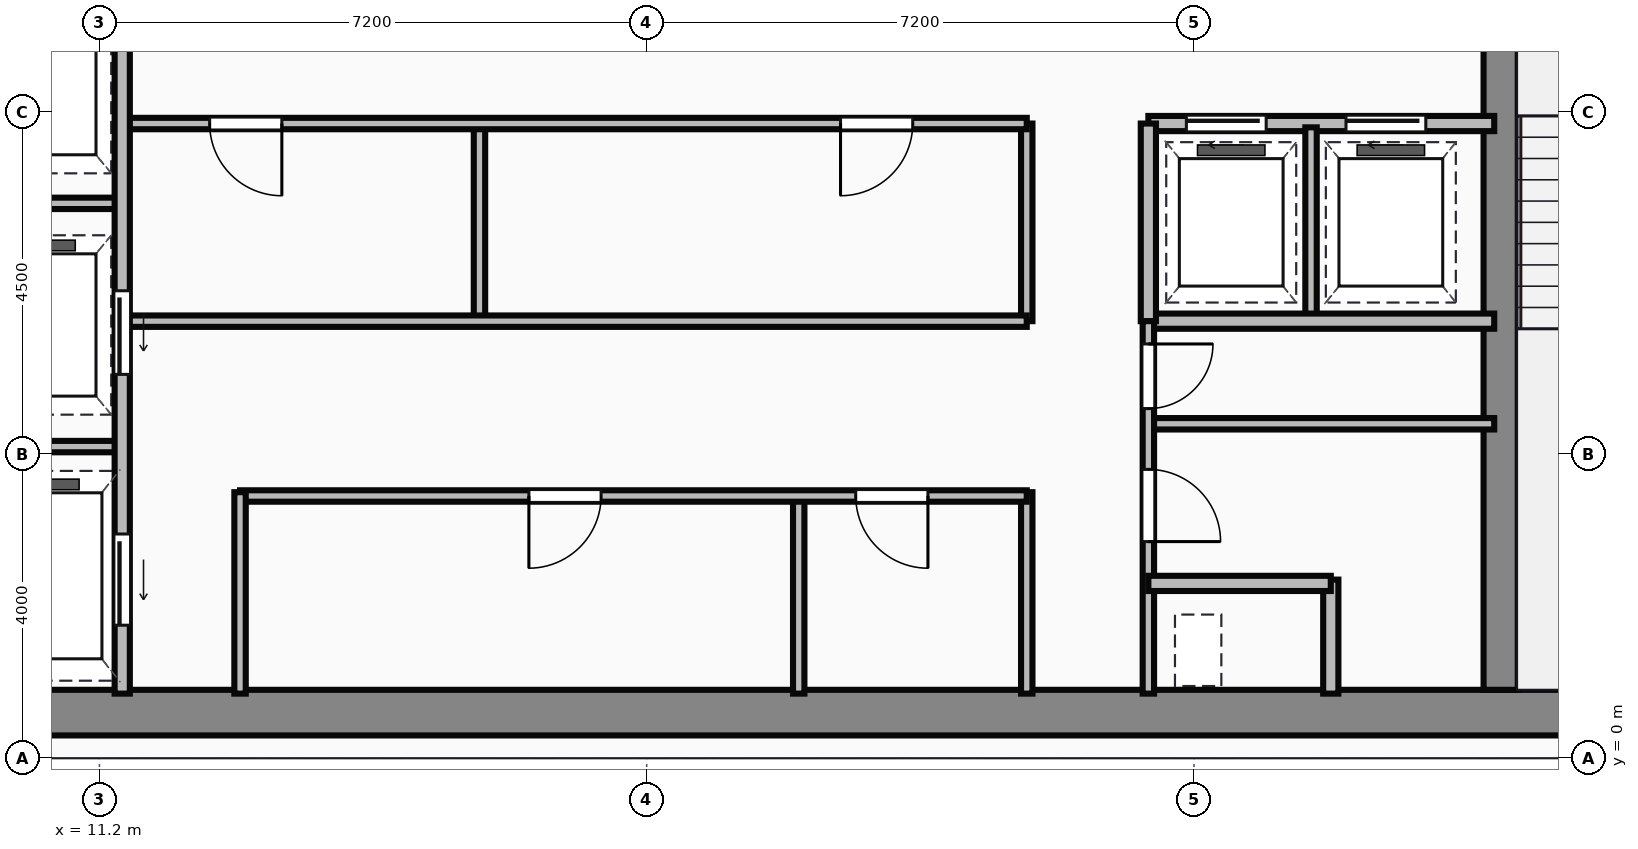
"""IFC4 building model, lengths in metres.
Left out: names, types, materials, properties, quantities, classifications, styles, units other than length and angle.
Written with IfcOpenShell. Run it as: python <this file> out.ifc"""

import sys

from ifc_helpers import new_model, si_unit, direction, frame, frame_2d, origin, place, context, subcontext, project, spatial, rectangle, extrude, source, transform, mapped, element, fill, save


model = new_model("IFC4")
c1 = context("Model", 3, precision=1e-05, world=origin(), true_north=direction((0.0, 1.0)))
c2 = subcontext(c1, "Body", "Model", "MODEL_VIEW")
j1 = project(units=[si_unit("LENGTHUNIT", "METRE"), si_unit("PLANEANGLEUNIT", "RADIAN")], contexts=[c1])
p1 = place(None, origin())
s1 = spatial("IfcSite", under=j1, at=p1, CompositionType="ELEMENT")
p2 = place(p1, origin())
s2 = spatial("IfcBuilding", under=s1, at=p2, CompositionType="ELEMENT")
p3 = place(p2, frame((0.0, 0.0, 199.55)))
s3 = spatial("IfcBuildingStorey", under=s2, at=p3, CompositionType="ELEMENT", Elevation=199.55)
m1 = source(origin(), c2, "Body", "SweptSolid", [
    extrude(rectangle(XDim=29.5, YDim=0.6, at=frame_2d((14.75, 0.0))), origin(), (0.0, 0.0, 1.0), 3.65),
])
p4 = place(p3, frame((4.5, 0.6, 0.0), z_axis=(0.0, 0.0, 1.0), x_axis=(1.0, 0.0, 0.0)))
e1 = element("IfcWall", 1, at=p4, inside=s3, PredefinedType="SHEAR", context=c2, shape_type="MappedRepresentation", body=[
    mapped(m1, transform((0.0, 0.0, 0.0))),
])
m2 = source(origin(), c2, "Body", "SweptSolid", [
    extrude(rectangle(XDim=12.5, YDim=0.45, at=frame_2d((6.25, 0.0))), origin(), (0.0, 0.0, 1.0), 3.65),
])
p5 = place(p3, frame((29.635, 0.9, 0.0), z_axis=(0.0, 0.0, 1.0), x_axis=(0.0, 1.0, 0.0)))
e2 = element("IfcWall", 2, at=p5, inside=s3, PredefinedType="SHEAR", context=c2, shape_type="MappedRepresentation", body=[
    mapped(m2, transform((0.0, 0.0, 0.0))),
])
m3 = source(origin(), c2, "Body", "SweptSolid", [
    extrude(rectangle(XDim=9.6, YDim=0.2, at=frame_2d((4.8, 0.0))), origin(), (0.0, 0.0, 1.0), 3.4),
])
p6 = place(p3, frame((11.5, 0.85, 0.0), z_axis=(0.0, 0.0, 1.0), x_axis=(0.0, 1.0, 0.0)))
e3 = element("IfcWall", 3, at=p6, inside=s3, PredefinedType="PARTITIONING", context=c2, shape_type="MappedRepresentation", body=[
    mapped(m3, transform((0.0, 0.0, 0.0))),
])
p7 = place(p6, frame((4.2, 0.0, 0.0)))
e4 = element("IfcOpeningElement", 4, at=p7, cuts=e3, PredefinedType="OPENING", context=c2, shape_type="SweptSolid", body=[
    extrude(rectangle(XDim=1.1, YDim=2.15, at=frame_2d((0.55, 1.075))), frame((0.0, 0.11, 0.0), z_axis=(0.0, -1.0, 0.0), x_axis=(1.0, 0.0, 0.0)), (0.0, 0.0, 1.0), 0.22),
])
p8 = place(p6, frame((0.9, 0.0, 0.0)))
e5 = element("IfcOpeningElement", 5, at=p8, cuts=e3, PredefinedType="OPENING", context=c2, shape_type="SweptSolid", body=[
    extrude(rectangle(XDim=1.2, YDim=2.15, at=frame_2d((0.6, 1.075))), frame((0.0, 0.11, 0.0), z_axis=(0.0, -1.0, 0.0), x_axis=(1.0, 0.0, 0.0)), (0.0, 0.0, 1.0), 0.22),
])
m4 = source(origin(), c2, "Body", "SweptSolid", [
    extrude(rectangle(XDim=2.4, YDim=0.15, at=frame_2d((1.2, 0.0))), origin(), (0.0, 0.0, 1.0), 3.4),
])
for number, where, z_axis, x_axis in (
    (6, (9.1, 4.1, 0.0), (0.0, 0.0, 1.0), (1.0, 0.0, 0.0)),
    (7, (9.1, 7.3, 0.0), (0.0, 0.0, 1.0), (1.0, 0.0, 0.0)),
):
    element("IfcWall", number, at=place(p3, frame(where, z_axis=z_axis, x_axis=x_axis)), inside=s3, PredefinedType="PARTITIONING", context=c2, shape_type="MappedRepresentation", body=[
        mapped(m4, transform((0.0, 0.0, 0.0))),
    ])
m5 = source(origin(), c2, "Body", "SweptSolid", [
    extrude(rectangle(XDim=2.65, YDim=0.15, at=frame_2d((1.325, 0.0))), origin(), (0.0, 0.0, 1.0), 3.4),
])
p9 = place(p3, frame((13.05, 0.85, 0.0), z_axis=(0.0, 0.0, 1.0), x_axis=(0.0, 1.0, 0.0)))
e8 = element("IfcWall", 8, at=p9, inside=s3, PredefinedType="PARTITIONING", context=c2, shape_type="MappedRepresentation", body=[
    mapped(m5, transform((0.0, 0.0, 0.0))),
])
m6 = source(origin(), c2, "Body", "SweptSolid", [
    extrude(rectangle(XDim=10.35, YDim=0.15, at=frame_2d((5.175, 0.0))), origin(), (0.0, 0.0, 1.0), 3.4),
])
p10 = place(p3, frame((13.05, 3.45, 0.0), z_axis=(0.0, 0.0, 1.0), x_axis=(1.0, 0.0, 0.0)))
e9 = element("IfcWall", 9, at=p10, inside=s3, PredefinedType="PARTITIONING", context=c2, shape_type="MappedRepresentation", body=[
    mapped(m6, transform((0.0, 0.0, 0.0))),
])
p11 = place(p10, frame((3.8, 0.0, 0.0)))
e10 = element("IfcOpeningElement", 10, at=p11, cuts=e9, PredefinedType="OPENING", context=c2, shape_type="SweptSolid", body=[
    extrude(rectangle(XDim=0.95, YDim=2.15, at=frame_2d((0.475, 1.075))), frame((0.0, 0.085, 0.0), z_axis=(0.0, -1.0, 0.0), x_axis=(1.0, 0.0, 0.0)), (0.0, 0.0, 1.0), 0.17),
])
p12 = place(p10, frame((8.1, 0.0, 0.0)))
e11 = element("IfcOpeningElement", 11, at=p12, cuts=e9, PredefinedType="OPENING", context=c2, shape_type="SweptSolid", body=[
    extrude(rectangle(XDim=0.95, YDim=2.15, at=frame_2d((0.475, 1.075))), frame((0.0, 0.085, 0.0), z_axis=(0.0, -1.0, 0.0), x_axis=(1.0, 0.0, 0.0)), (0.0, 0.0, 1.0), 0.17),
])
p13 = place(p3, frame((23.4, 0.85, 0.0), z_axis=(0.0, 0.0, 1.0), x_axis=(0.0, 1.0, 0.0)))
e12 = element("IfcWall", 12, at=p13, inside=s3, PredefinedType="PARTITIONING", context=c2, shape_type="MappedRepresentation", body=[
    mapped(m5, transform((0.0, 0.0, 0.0))),
])
m7 = source(origin(), c2, "Body", "SweptSolid", [
    extrude(rectangle(XDim=2.6, YDim=0.15, at=frame_2d((1.3, 0.0))), origin(), (0.0, 0.0, 1.0), 3.4),
])
p14 = place(p3, frame((20.4, 0.85, 0.0), z_axis=(0.0, 0.0, 1.0), x_axis=(0.0, 1.0, 0.0)))
e13 = element("IfcWall", 13, at=p14, inside=s3, PredefinedType="PARTITIONING", context=c2, shape_type="MappedRepresentation", body=[
    mapped(m7, transform((0.0, 0.0, 0.0))),
])
m8 = source(origin(), c2, "Body", "SweptSolid", [
    extrude(rectangle(XDim=11.85, YDim=0.15, at=frame_2d((5.925, 0.0))), origin(), (0.0, 0.0, 1.0), 3.4),
])
p15 = place(p3, frame((11.55, 5.75, 0.0), z_axis=(0.0, 0.0, 1.0), x_axis=(1.0, 0.0, 0.0)))
e14 = element("IfcWall", 14, at=p15, inside=s3, PredefinedType="PARTITIONING", context=c2, shape_type="MappedRepresentation", body=[
    mapped(m8, transform((0.0, 0.0, 0.0))),
])
p16 = place(p3, frame((11.55, 8.35, 0.0), z_axis=(0.0, 0.0, 1.0), x_axis=(1.0, 0.0, 0.0)))
e15 = element("IfcWall", 15, at=p16, inside=s3, PredefinedType="PARTITIONING", context=c2, shape_type="MappedRepresentation", body=[
    mapped(m8, transform((0.0, 0.0, 0.0))),
])
p17 = place(p16, frame((1.1, 0.0, 0.0)))
e16 = element("IfcOpeningElement", 16, at=p17, cuts=e15, PredefinedType="OPENING", context=c2, shape_type="SweptSolid", body=[
    extrude(rectangle(XDim=0.95, YDim=2.15, at=frame_2d((0.475, 1.075))), frame((0.0, 0.085, 0.0), z_axis=(0.0, -1.0, 0.0), x_axis=(1.0, 0.0, 0.0)), (0.0, 0.0, 1.0), 0.17),
])
p18 = place(p16, frame((9.4, 0.0, 0.0)))
e17 = element("IfcOpeningElement", 17, at=p18, cuts=e15, PredefinedType="OPENING", context=c2, shape_type="SweptSolid", body=[
    extrude(rectangle(XDim=0.95, YDim=2.15, at=frame_2d((0.475, 1.075))), frame((0.0, 0.085, 0.0), z_axis=(0.0, -1.0, 0.0), x_axis=(1.0, 0.0, 0.0)), (0.0, 0.0, 1.0), 0.17),
])
m9 = source(origin(), c2, "Body", "SweptSolid", [
    extrude(rectangle(XDim=2.6, YDim=0.15, at=frame_2d((1.3, 0.0))), origin(), (0.0, 0.0, 1.0), 3.4),
])
p19 = place(p3, frame((23.4, 5.75, 0.0), z_axis=(0.0, 0.0, 1.0), x_axis=(0.0, 1.0, 0.0)))
e18 = element("IfcWall", 18, at=p19, inside=s3, PredefinedType="PARTITIONING", context=c2, shape_type="MappedRepresentation", body=[
    mapped(m9, transform((0.0, 0.0, 0.0))),
])
m10 = source(origin(), c2, "Body", "SweptSolid", [
    extrude(rectangle(XDim=2.5, YDim=0.15, at=frame_2d((1.25, 0.0))), origin(), (0.0, 0.0, 1.0), 3.4),
])
p20 = place(p3, frame((16.2, 5.8, 0.0), z_axis=(0.0, 0.0, 1.0), x_axis=(0.0, 1.0, 0.0)))
e19 = element("IfcWall", 19, at=p20, inside=s3, PredefinedType="PARTITIONING", context=c2, shape_type="MappedRepresentation", body=[
    mapped(m10, transform((0.0, 0.0, 0.0))),
])
m11 = source(origin(), c2, "Body", "SweptSolid", [
    extrude(rectangle(XDim=4.55, YDim=0.2, at=frame_2d((2.275, 0.0))), origin(), (0.0, 0.0, 1.0), 3.4),
])
p21 = place(p3, frame((25.0, 8.35, 0.0), z_axis=(0.0, 0.0, 1.0), x_axis=(1.0, 0.0, 0.0)))
e20 = element("IfcWall", 20, at=p21, inside=s3, PredefinedType="PARTITIONING", context=c2, shape_type="MappedRepresentation", body=[
    mapped(m11, transform((0.0, 0.0, 0.0))),
])
p22 = place(p21, frame((0.5, 0.0, 0.0)))
e21 = element("IfcOpeningElement", 21, at=p22, cuts=e20, PredefinedType="OPENING", context=c2, shape_type="SweptSolid", body=[
    extrude(rectangle(XDim=1.05, YDim=2.15, at=frame_2d((0.525, 1.075))), frame((0.0, 0.11, 0.0), z_axis=(0.0, -1.0, 0.0), x_axis=(1.0, 0.0, 0.0)), (0.0, 0.0, 1.0), 0.22),
])
p23 = place(p21, frame((2.6, 0.0, 0.0)))
e22 = element("IfcOpeningElement", 22, at=p23, cuts=e20, PredefinedType="OPENING", context=c2, shape_type="SweptSolid", body=[
    extrude(rectangle(XDim=1.05, YDim=2.15, at=frame_2d((0.525, 1.075))), frame((0.0, 0.11, 0.0), z_axis=(0.0, -1.0, 0.0), x_axis=(1.0, 0.0, 0.0)), (0.0, 0.0, 1.0), 0.22),
])
p24 = place(p3, frame((25.0, 5.75, 0.0), z_axis=(0.0, 0.0, 1.0), x_axis=(1.0, 0.0, 0.0)))
e23 = element("IfcWall", 23, at=p24, inside=s3, PredefinedType="PARTITIONING", context=c2, shape_type="MappedRepresentation", body=[
    mapped(m11, transform((0.0, 0.0, 0.0))),
])
m12 = source(origin(), c2, "Body", "SweptSolid", [
    extrude(rectangle(XDim=2.6, YDim=0.2, at=frame_2d((1.3, 0.0))), origin(), (0.0, 0.0, 1.0), 3.4),
])
p25 = place(p3, frame((25.0, 5.75, 0.0), z_axis=(0.0, 0.0, 1.0), x_axis=(0.0, 1.0, 0.0)))
e24 = element("IfcWall", 24, at=p25, inside=s3, PredefinedType="PARTITIONING", context=c2, shape_type="MappedRepresentation", body=[
    mapped(m12, transform((0.0, 0.0, 0.0))),
])
p26 = place(p3, frame((27.14, 5.8, 0.0), z_axis=(0.0, 0.0, 1.0), x_axis=(0.0, 1.0, 0.0)))
e25 = element("IfcWall", 25, at=p26, inside=s3, PredefinedType="PARTITIONING", context=c2, shape_type="MappedRepresentation", body=[
    mapped(m10, transform((0.0, 0.0, 0.0))),
])
m13 = source(origin(), c2, "Body", "SweptSolid", [
    extrude(rectangle(XDim=4.9, YDim=0.15, at=frame_2d((2.45, 0.0))), origin(), (0.0, 0.0, 1.0), 3.4),
])
p27 = place(p3, frame((25.0, 0.85, 0.0), z_axis=(0.0, 0.0, 1.0), x_axis=(0.0, 1.0, 0.0)))
e26 = element("IfcWall", 26, at=p27, inside=s3, PredefinedType="PARTITIONING", context=c2, shape_type="MappedRepresentation", body=[
    mapped(m13, transform((0.0, 0.0, 0.0))),
])
p28 = place(p27, frame((2.0, 0.0, 0.0)))
e27 = element("IfcOpeningElement", 27, at=p28, cuts=e26, PredefinedType="OPENING", context=c2, shape_type="SweptSolid", body=[
    extrude(rectangle(XDim=0.95, YDim=2.15, at=frame_2d((0.475, 1.075))), frame((0.0, 0.085, 0.0), z_axis=(0.0, -1.0, 0.0), x_axis=(1.0, 0.0, 0.0)), (0.0, 0.0, 1.0), 0.17),
])
p29 = place(p27, frame((3.75, 0.0, 0.0)))
e28 = element("IfcOpeningElement", 28, at=p29, cuts=e26, PredefinedType="OPENING", context=c2, shape_type="SweptSolid", body=[
    extrude(rectangle(XDim=0.85, YDim=2.15, at=frame_2d((0.425, 1.075))), frame((0.0, 0.085, 0.0), z_axis=(0.0, -1.0, 0.0), x_axis=(1.0, 0.0, 0.0)), (0.0, 0.0, 1.0), 0.17),
])
m14 = source(origin(), c2, "Body", "SweptSolid", [
    extrude(rectangle(XDim=2.4, YDim=0.2, at=frame_2d((1.2, 0.0))), origin(), (0.0, 0.0, 1.0), 3.4),
])
p30 = place(p3, frame((25.0, 2.3, 0.0), z_axis=(0.0, 0.0, 1.0), x_axis=(1.0, 0.0, 0.0)))
e29 = element("IfcWall", 29, at=p30, inside=s3, PredefinedType="PARTITIONING", context=c2, shape_type="MappedRepresentation", body=[
    mapped(m14, transform((0.0, 0.0, 0.0))),
])
m15 = source(origin(), c2, "Body", "SweptSolid", [
    extrude(rectangle(XDim=1.5, YDim=0.2, at=frame_2d((0.75, 0.0))), origin(), (0.0, 0.0, 1.0), 3.4),
])
p31 = place(p3, frame((27.4, 0.85, 0.0), z_axis=(0.0, 0.0, 1.0), x_axis=(0.0, 1.0, 0.0)))
e30 = element("IfcWall", 30, at=p31, inside=s3, PredefinedType="PARTITIONING", context=c2, shape_type="MappedRepresentation", body=[
    mapped(m15, transform((0.0, 0.0, 0.0))),
])
m16 = source(origin(), c2, "Body", "SweptSolid", [
    extrude(rectangle(XDim=4.55, YDim=0.15, at=frame_2d((2.275, 0.0))), origin(), (0.0, 0.0, 1.0), 3.4),
])
p32 = place(p3, frame((25.0, 4.4, 0.0), z_axis=(0.0, 0.0, 1.0), x_axis=(1.0, 0.0, 0.0)))
e31 = element("IfcWall", 31, at=p32, inside=s3, PredefinedType="PARTITIONING", context=c2, shape_type="MappedRepresentation", body=[
    mapped(m16, transform((0.0, 0.0, 0.0))),
])
m17 = source(origin(), c2, "Body", "SweptSolid", [
    extrude(rectangle(XDim=1.1, YDim=2.15, at=frame_2d((0.55, 1.075))), frame((0.0, 0.025, 0.0), z_axis=(0.0, -1.0, 0.0), x_axis=(1.0, 0.0, 0.0)), (0.0, 0.0, 1.0), 0.05),
])
p33 = place(p7, frame((1.1, 0.0, 0.0), z_axis=(0.0, 0.0, 1.0), x_axis=(-1.0, 0.0, 0.0)))
e32 = element("IfcDoor", 32, at=p33, inside=s3, OperationType="SLIDING_TO_LEFT", PredefinedType="DOOR", context=c2, shape_type="MappedRepresentation", body=[
    mapped(m17, transform((0.0, 0.0, 0.0))),
])
fill(e4, e32)
m18 = source(origin(), c2, "Body", "SweptSolid", [
    extrude(rectangle(XDim=1.2, YDim=2.15, at=frame_2d((0.6, 1.075))), frame((0.0, 0.025, 0.0), z_axis=(0.0, -1.0, 0.0), x_axis=(1.0, 0.0, 0.0)), (0.0, 0.0, 1.0), 0.05),
])
p34 = place(p8, frame((1.2, 0.0, 0.0), z_axis=(0.0, 0.0, 1.0), x_axis=(-1.0, 0.0, 0.0)))
e33 = element("IfcDoor", 33, at=p34, inside=s3, OperationType="SLIDING_TO_LEFT", PredefinedType="DOOR", context=c2, shape_type="MappedRepresentation", body=[
    mapped(m18, transform((0.0, 0.0, 0.0))),
])
fill(e5, e33)
m19 = source(origin(), c2, "Body", "SweptSolid", [
    extrude(rectangle(XDim=0.95, YDim=2.15, at=frame_2d((0.475, 1.075))), frame((0.0, 0.025, 0.0), z_axis=(0.0, -1.0, 0.0), x_axis=(1.0, 0.0, 0.0)), (0.0, 0.0, 1.0), 0.05),
])
p35 = place(p11, origin())
e34 = element("IfcDoor", 34, at=p35, inside=s3, OperationType="SINGLE_SWING_LEFT", PredefinedType="DOOR", context=c2, shape_type="MappedRepresentation", body=[
    mapped(m19, transform((0.0, 0.0, 0.0))),
])
fill(e10, e34)
p36 = place(p12, origin())
e35 = element("IfcDoor", 35, at=p36, inside=s3, OperationType="SINGLE_SWING_RIGHT", PredefinedType="DOOR", context=c2, shape_type="MappedRepresentation", body=[
    mapped(m19, transform((0.0, 0.0, 0.0))),
])
fill(e11, e35)
p37 = place(p17, origin())
e36 = element("IfcDoor", 36, at=p37, inside=s3, OperationType="SINGLE_SWING_RIGHT", PredefinedType="DOOR", context=c2, shape_type="MappedRepresentation", body=[
    mapped(m19, transform((0.0, 0.0, 0.0))),
])
fill(e16, e36)
p38 = place(p18, origin())
e37 = element("IfcDoor", 37, at=p38, inside=s3, OperationType="SINGLE_SWING_LEFT", PredefinedType="DOOR", context=c2, shape_type="MappedRepresentation", body=[
    mapped(m19, transform((0.0, 0.0, 0.0))),
])
fill(e17, e37)
m20 = source(origin(), c2, "Body", "SweptSolid", [
    extrude(rectangle(XDim=1.05, YDim=2.15, at=frame_2d((0.525, 1.075))), frame((0.0, 0.025, 0.0), z_axis=(0.0, -1.0, 0.0), x_axis=(1.0, 0.0, 0.0)), (0.0, 0.0, 1.0), 0.05),
])
p39 = place(p22, origin())
e38 = element("IfcDoor", 38, at=p39, inside=s3, OperationType="SLIDING_TO_LEFT", PredefinedType="DOOR", context=c2, shape_type="MappedRepresentation", body=[
    mapped(m20, transform((0.0, 0.0, 0.0))),
])
fill(e21, e38)
p40 = place(p23, origin())
e39 = element("IfcDoor", 39, at=p40, inside=s3, OperationType="SLIDING_TO_LEFT", PredefinedType="DOOR", context=c2, shape_type="MappedRepresentation", body=[
    mapped(m20, transform((0.0, 0.0, 0.0))),
])
fill(e22, e39)
p41 = place(p28, origin())
e40 = element("IfcDoor", 40, at=p41, inside=s3, OperationType="SINGLE_SWING_LEFT", PredefinedType="DOOR", context=c2, shape_type="MappedRepresentation", body=[
    mapped(m19, transform((0.0, 0.0, 0.0))),
])
fill(e27, e40)
m21 = source(origin(), c2, "Body", "SweptSolid", [
    extrude(rectangle(XDim=0.85, YDim=2.15, at=frame_2d((0.425, 1.075))), frame((0.0, 0.025, 0.0), z_axis=(0.0, -1.0, 0.0), x_axis=(1.0, 0.0, 0.0)), (0.0, 0.0, 1.0), 0.05),
])
p42 = place(p29, origin())
e41 = element("IfcDoor", 41, at=p42, inside=s3, OperationType="SINGLE_SWING_RIGHT", PredefinedType="DOOR", context=c2, shape_type="MappedRepresentation", body=[
    mapped(m21, transform((0.0, 0.0, 0.0))),
])
fill(e28, e41)
save(model, sys.argv[1])
